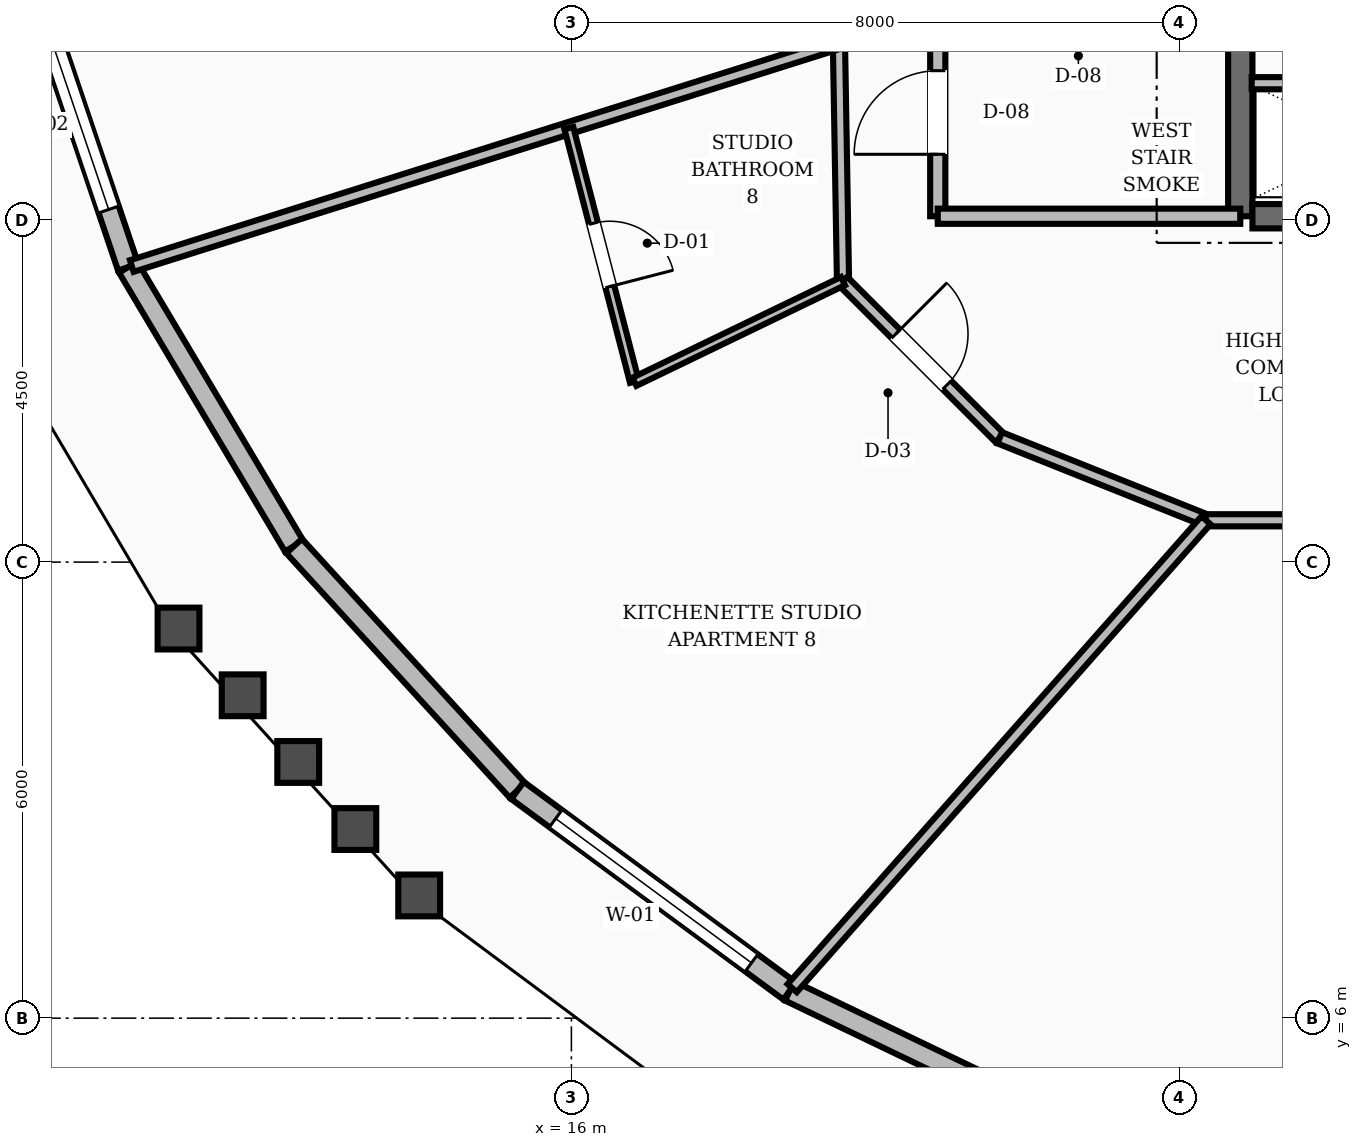
"""IFC4 building model, lengths in metres.
Left out: names, types, materials, properties, quantities, classifications, styles, units other than length and angle.
Written with IfcOpenShell. Run it as: python <this file> out.ifc"""

import sys

from ifc_helpers import new_model, si_unit, direction, frame, frame_2d, origin, place, context, subcontext, project, spatial, rectangle, extrude, element, fill, save


model = new_model("IFC4")
c1 = context("Model", 3, precision=1e-05, world=origin(), true_north=direction((0.0, 1.0)))
c2 = subcontext(c1, "Body", "Model", "MODEL_VIEW")
j1 = project(units=[si_unit("LENGTHUNIT", "METRE"), si_unit("PLANEANGLEUNIT", "RADIAN")], contexts=[c1])
p1 = place(None, origin())
s1 = spatial("IfcSite", under=j1, at=p1, CompositionType="ELEMENT")
p2 = place(p1, origin())
s2 = spatial("IfcBuilding", under=s1, at=p2, CompositionType="ELEMENT")
p3 = place(p2, frame((0.0, 0.0, 214.8)))
s3 = spatial("IfcBuildingStorey", under=s2, at=p3, CompositionType="ELEMENT", Elevation=214.8)
p4 = place(p3, frame((24.8, 16.55, 0.0), z_axis=(0.0, 0.0, 1.0), x_axis=(0.0, 1.0, 0.0)))
e1 = element("IfcWall", 1, at=p4, inside=s3, PredefinedType="SHEAR", context=c2, shape_type="SweptSolid", body=[
    extrude(rectangle(XDim=6.3, YDim=0.32, at=frame_2d((3.15, 0.0))), origin(), (0.0, 0.0, 1.0), 3.6),
])
p5 = place(p3, frame((24.96, 16.55, 0.0), z_axis=(0.0, 0.0, 1.0), x_axis=(1.0, 0.0, 0.0)))
e2 = element("IfcWall", 2, at=p5, inside=s3, PredefinedType="SHEAR", context=c2, shape_type="SweptSolid", body=[
    extrude(rectangle(XDim=3.24, YDim=0.32, at=frame_2d((1.62, 0.0))), origin(), (0.0, 0.0, 1.0), 3.6),
])
p6 = place(p3, frame((8.824, 19.86, 0.0), z_axis=(0.0, 0.0, 1.0), x_axis=(0.320060327551, -0.947397164197, 0.0)))
e3 = element("IfcWall", 3, at=p6, inside=s3, PredefinedType="STANDARD", context=c2, shape_type="SweptSolid", body=[
    extrude(rectangle(XDim=4.201, YDim=0.28, at=frame_2d((2.101, 0.0))), origin(), (0.0, 0.0, 1.0), 2.88),
])
p7 = place(p6, frame((0.801, 0.0, 0.8)))
e4 = element("IfcOpeningElement", 4, at=p7, cuts=e3, PredefinedType="OPENING", context=c2, shape_type="SweptSolid", body=[
    extrude(rectangle(XDim=2.6, YDim=1.65, at=frame_2d((1.3, 0.825))), frame((0.0, 0.15, 0.0), z_axis=(0.0, -1.0, 0.0), x_axis=(1.0, 0.0, 0.0)), (0.0, 0.0, 1.0), 0.3),
])
p8 = place(p3, frame((10.169, 15.88, 0.0), z_axis=(0.0, 0.0, 1.0), x_axis=(0.511481849, -0.859294081292, 0.0)))
e5 = element("IfcWall", 5, at=p8, inside=s3, PredefinedType="STANDARD", context=c2, shape_type="SweptSolid", body=[
    extrude(rectangle(XDim=4.269, YDim=0.28, at=frame_2d((2.135, 0.0))), origin(), (0.0, 0.0, 1.0), 2.88),
])
p9 = place(p3, frame((12.352, 12.211, 0.0), z_axis=(0.0, 0.0, 1.0), x_axis=(0.674642715371, -0.73814443478, 0.0)))
e6 = element("IfcWall", 6, at=p9, inside=s3, PredefinedType="STANDARD", context=c2, shape_type="SweptSolid", body=[
    extrude(rectangle(XDim=4.356, YDim=0.28, at=frame_2d((2.178, 0.0))), origin(), (0.0, 0.0, 1.0), 2.88),
])
p10 = place(p3, frame((15.291, 8.996, 0.0), z_axis=(0.0, 0.0, 1.0), x_axis=(0.8050103103, -0.593260819801, 0.0)))
e7 = element("IfcWall", 7, at=p10, inside=s3, PredefinedType="STANDARD", context=c2, shape_type="SweptSolid", body=[
    extrude(rectangle(XDim=4.448, YDim=0.28, at=frame_2d((2.224, 0.0))), origin(), (0.0, 0.0, 1.0), 2.88),
])
p11 = place(p10, frame((0.624, 0.0, 0.8)))
e8 = element("IfcOpeningElement", 8, at=p11, cuts=e7, PredefinedType="OPENING", context=c2, shape_type="SweptSolid", body=[
    extrude(rectangle(XDim=3.2, YDim=1.65, at=frame_2d((1.6, 0.825))), frame((0.0, 0.15, 0.0), z_axis=(0.0, -1.0, 0.0), x_axis=(1.0, 0.0, 0.0)), (0.0, 0.0, 1.0), 0.3),
])
p12 = place(p3, frame((18.872, 6.357, 0.0), z_axis=(0.0, 0.0, 1.0), x_axis=(0.90155079899, -0.432673267999, 0.0)))
e9 = element("IfcWall", 9, at=p12, inside=s3, PredefinedType="STANDARD", context=c2, shape_type="SweptSolid", body=[
    extrude(rectangle(XDim=4.531, YDim=0.28, at=frame_2d((2.266, 0.0))), origin(), (0.0, 0.0, 1.0), 2.88),
])
p13 = place(p3, frame((20.82, 16.55, 0.0), z_axis=(0.0, 0.0, 1.0), x_axis=(0.0, 1.0, 0.0)))
e10 = element("IfcWall", 10, at=p13, inside=s3, PredefinedType="SOLIDWALL", context=c2, shape_type="SweptSolid", body=[
    extrude(rectangle(XDim=2.73, YDim=0.2, at=frame_2d((1.365, 0.0))), origin(), (0.0, 0.0, 1.0), 2.87),
])
p14 = place(p13, frame((0.815, 0.0, 0.0)))
e11 = element("IfcOpeningElement", 11, at=p14, cuts=e10, PredefinedType="OPENING", context=c2, shape_type="SweptSolid", body=[
    extrude(rectangle(XDim=1.1, YDim=2.1, at=frame_2d((0.55, 1.05))), frame((0.0, 0.11, 0.0), z_axis=(0.0, -1.0, 0.0), x_axis=(1.0, 0.0, 0.0)), (0.0, 0.0, 1.0), 0.22),
])
p15 = place(p3, frame((20.82, 16.55, 0.0), z_axis=(0.0, 0.0, 1.0), x_axis=(1.0, 0.0, 0.0)))
e12 = element("IfcWall", 12, at=p15, inside=s3, PredefinedType="SOLIDWALL", context=c2, shape_type="SweptSolid", body=[
    extrude(rectangle(XDim=3.98, YDim=0.2, at=frame_2d((1.99, 0.0))), origin(), (0.0, 0.0, 1.0), 2.87),
])
p16 = place(p3, frame((24.95, 18.3, 0.0), z_axis=(0.0, 0.0, 1.0), x_axis=(1.0, 0.0, 0.0)))
e13 = element("IfcWall", 13, at=p16, inside=s3, PredefinedType="SOLIDWALL", context=c2, shape_type="SweptSolid", body=[
    extrude(rectangle(XDim=3.2, YDim=0.16, at=frame_2d((1.6, 0.0))), origin(), (0.0, 0.0, 1.0), 2.87),
])
p17 = place(p3, frame((19.52, 18.831, 0.0), z_axis=(0.0, 0.0, 1.0), x_axis=(0.016981035134, -0.999855811828, 0.0)))
e14 = element("IfcWall", 14, at=p17, inside=s3, PredefinedType="SOLIDWALL", context=c2, shape_type="SweptSolid", body=[
    extrude(rectangle(XDim=3.134, YDim=0.16, at=frame_2d((1.567, 0.0))), origin(), (0.0, 0.0, 1.0), 2.87),
])
p18 = place(p3, frame((19.573, 15.697, 0.0), z_axis=(0.0, 0.0, 1.0), x_axis=(0.707106781187, -0.707106781187, 0.0)))
e15 = element("IfcWall", 15, at=p18, inside=s3, PredefinedType="SOLIDWALL", context=c2, shape_type="SweptSolid", body=[
    extrude(rectangle(XDim=2.916, YDim=0.16, at=frame_2d((1.458, 0.0))), origin(), (0.0, 0.0, 1.0), 2.87),
])
p19 = place(p18, frame((0.983, 0.0, 0.0)))
e16 = element("IfcOpeningElement", 16, at=p19, cuts=e15, PredefinedType="OPENING", context=c2, shape_type="SweptSolid", body=[
    extrude(rectangle(XDim=0.95, YDim=2.1, at=frame_2d((0.475, 1.05))), frame((0.0, 0.09, 0.0), z_axis=(0.0, -1.0, 0.0), x_axis=(1.0, 0.0, 0.0)), (0.0, 0.0, 1.0), 0.18),
])
p20 = place(p3, frame((21.635, 13.635, 0.0), z_axis=(0.0, 0.0, 1.0), x_axis=(0.92856882165, -0.371160266542, 0.0)))
e17 = element("IfcWall", 17, at=p20, inside=s3, PredefinedType="SOLIDWALL", context=c2, shape_type="SweptSolid", body=[
    extrude(rectangle(XDim=2.923, YDim=0.16, at=frame_2d((1.461, 0.0))), origin(), (0.0, 0.0, 1.0), 2.87),
])
p21 = place(p3, frame((24.349, 12.55, 0.0), z_axis=(0.0, 0.0, 1.0), x_axis=(1.0, 0.0, 0.0)))
e18 = element("IfcWall", 18, at=p21, inside=s3, PredefinedType="SOLIDWALL", context=c2, shape_type="SweptSolid", body=[
    extrude(rectangle(XDim=2.908, YDim=0.16, at=frame_2d((1.454, 0.0))), origin(), (0.0, 0.0, 1.0), 2.87),
])
p22 = place(p3, frame((19.52, 18.831, 0.0), z_axis=(0.0, 0.0, 1.0), x_axis=(-0.953655254227, -0.300901405921, 0.0)))
e19 = element("IfcWall", 19, at=p22, inside=s3, PredefinedType="SOLIDWALL", context=c2, shape_type="SweptSolid", body=[
    extrude(rectangle(XDim=9.756, YDim=0.16, at=frame_2d((4.878, 0.0))), origin(), (0.0, 0.0, 1.0), 2.87),
])
p23 = place(p3, frame((15.967, 17.709, 0.0), z_axis=(0.0, 0.0, 1.0), x_axis=(0.250327875267, -0.968161120302, 0.0)))
e20 = element("IfcWall", 20, at=p23, inside=s3, PredefinedType="PARTITIONING", context=c2, shape_type="SweptSolid", body=[
    extrude(rectangle(XDim=3.447, YDim=0.12, at=frame_2d((1.723, 0.0))), origin(), (0.0, 0.0, 1.0), 2.87),
])
p24 = place(p23, frame((1.293, 0.0, 0.0)))
e21 = element("IfcOpeningElement", 21, at=p24, cuts=e20, PredefinedType="OPENING", context=c2, shape_type="SweptSolid", body=[
    extrude(rectangle(XDim=0.86, YDim=2.1, at=frame_2d((0.43, 1.05))), frame((0.0, 0.07, 0.0), z_axis=(0.0, -1.0, 0.0), x_axis=(1.0, 0.0, 0.0)), (0.0, 0.0, 1.0), 0.14),
])
p25 = place(p3, frame((19.573, 15.697, 0.0), z_axis=(0.0, 0.0, 1.0), x_axis=(-0.900574352632, -0.434702007565, 0.0)))
e22 = element("IfcWall", 22, at=p25, inside=s3, PredefinedType="PARTITIONING", context=c2, shape_type="SweptSolid", body=[
    extrude(rectangle(XDim=3.047, YDim=0.12, at=frame_2d((1.523, 0.0))), origin(), (0.0, 0.0, 1.0), 2.87),
])
p26 = place(p3, frame((24.349, 12.55, 0.0), z_axis=(0.0, 0.0, 1.0), x_axis=(-0.662525161909, -0.749039658388, 0.0)))
e23 = element("IfcWall", 23, at=p26, inside=s3, PredefinedType="SOLIDWALL", context=c2, shape_type="SweptSolid", body=[
    extrude(rectangle(XDim=8.218, YDim=0.16, at=frame_2d((4.109, 0.0))), origin(), (0.0, 0.0, 1.0), 2.87),
])
p27 = place(p7, origin())
e24 = element("IfcWindow", 24, at=p27, inside=s3, PartitioningType="SINGLE_PANEL", PredefinedType="WINDOW", context=c2, shape_type="SweptSolid", body=[
    extrude(rectangle(XDim=2.6, YDim=1.65, at=frame_2d((1.3, 0.825))), frame((0.0, 0.03, 0.0), z_axis=(0.0, -1.0, 0.0), x_axis=(1.0, 0.0, 0.0)), (0.0, 0.0, 1.0), 0.06),
])
fill(e4, e24)
p28 = place(p11, origin())
e25 = element("IfcWindow", 25, at=p28, inside=s3, PartitioningType="SINGLE_PANEL", PredefinedType="WINDOW", context=c2, shape_type="SweptSolid", body=[
    extrude(rectangle(XDim=3.2, YDim=1.65, at=frame_2d((1.6, 0.825))), frame((0.0, 0.03, 0.0), z_axis=(0.0, -1.0, 0.0), x_axis=(1.0, 0.0, 0.0)), (0.0, 0.0, 1.0), 0.06),
])
fill(e8, e25)
p29 = place(p14, origin())
e26 = element("IfcDoor", 26, at=p29, inside=s3, OperationType="SINGLE_SWING_LEFT", PredefinedType="DOOR", context=c2, shape_type="SweptSolid", body=[
    extrude(rectangle(XDim=1.1, YDim=2.1, at=frame_2d((0.55, 1.05))), frame((0.0, 0.025, 0.0), z_axis=(0.0, -1.0, 0.0), x_axis=(1.0, 0.0, 0.0)), (0.0, 0.0, 1.0), 0.05),
])
fill(e11, e26)
p30 = place(p24, origin())
e27 = element("IfcDoor", 27, at=p30, inside=s3, OperationType="SINGLE_SWING_RIGHT", PredefinedType="DOOR", context=c2, shape_type="SweptSolid", body=[
    extrude(rectangle(XDim=0.86, YDim=2.1, at=frame_2d((0.43, 1.05))), frame((0.0, 0.025, 0.0), z_axis=(0.0, -1.0, 0.0), x_axis=(1.0, 0.0, 0.0)), (0.0, 0.0, 1.0), 0.05),
])
fill(e21, e27)
p31 = place(p19, origin())
e28 = element("IfcDoor", 28, at=p31, inside=s3, OperationType="SINGLE_SWING_LEFT", PredefinedType="DOOR", context=c2, shape_type="SweptSolid", body=[
    extrude(rectangle(XDim=0.95, YDim=2.1, at=frame_2d((0.475, 1.05))), frame((0.0, 0.025, 0.0), z_axis=(0.0, -1.0, 0.0), x_axis=(1.0, 0.0, 0.0)), (0.0, 0.0, 1.0), 0.05),
])
fill(e16, e28)
save(model, sys.argv[1])
